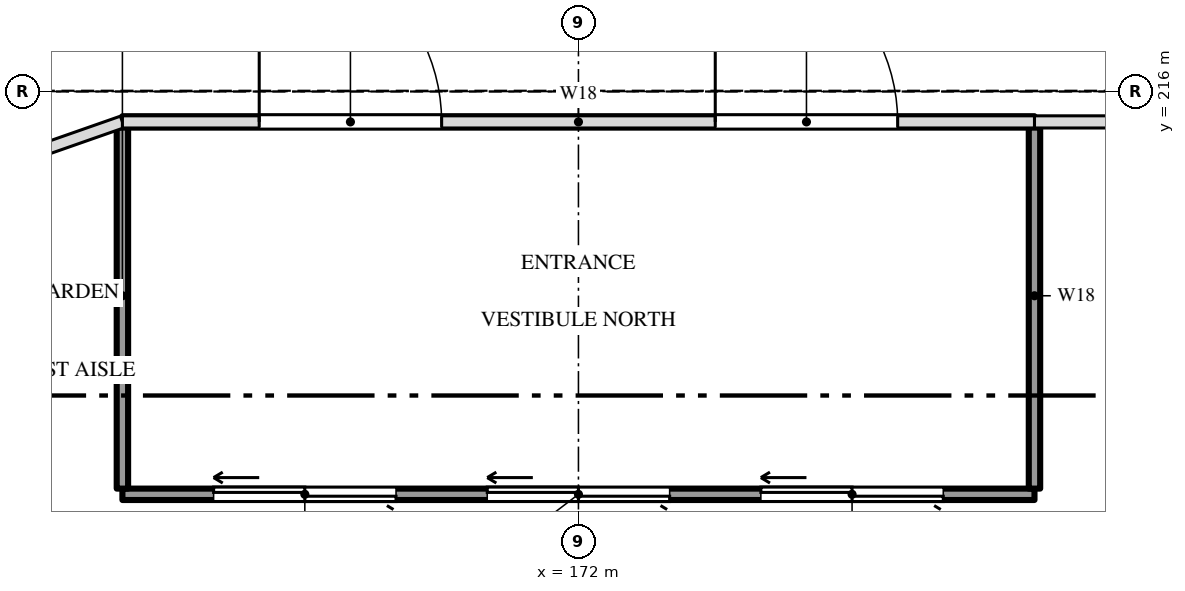
"""IFC4 building model, lengths in metres.
Left out: names, types, materials, properties, quantities, classifications, styles, units other than length and angle.
Written with IfcOpenShell. Run it as: python <this file> out.ifc"""

import sys

from ifc_helpers import new_model, si_unit, direction, frame, frame_2d, origin, place, context, subcontext, project, spatial, rectangle, extrude, element, fill, save


model = new_model("IFC4")
c1 = context("Model", 3, precision=1e-05, world=origin(), true_north=direction((0.0, 1.0)))
c2 = subcontext(c1, "Body", "Model", "MODEL_VIEW")
j1 = project(units=[si_unit("LENGTHUNIT", "METRE"), si_unit("PLANEANGLEUNIT", "RADIAN")], contexts=[c1])
p1 = place(None, origin())
s1 = spatial("IfcSite", under=j1, at=p1, CompositionType="ELEMENT")
p2 = place(p1, origin())
s2 = spatial("IfcBuilding", under=s1, at=p2, CompositionType="ELEMENT")
p3 = place(p2, origin())
s3 = spatial("IfcBuildingStorey", under=s2, at=p3, CompositionType="ELEMENT", Elevation=0.0)
p4 = place(p3, frame((166.0, 215.6, 0.0), z_axis=(0.0, 0.0, 1.0), x_axis=(1.0, 0.0, 0.0)))
e1 = element("IfcWall", 1, at=p4, inside=s3, PredefinedType="SOLIDWALL", context=c2, shape_type="SweptSolid", body=[
    extrude(rectangle(XDim=12.0, YDim=0.15, at=frame_2d((6.0, 0.0))), origin(), (0.0, 0.0, 1.0), 4.3),
])
p5 = place(p4, frame((1.8, 0.0, 0.0)))
e2 = element("IfcOpeningElement", 2, at=p5, cuts=e1, PredefinedType="OPENING", context=c2, shape_type="SweptSolid", body=[
    extrude(rectangle(XDim=2.4, YDim=2.4, at=frame_2d((1.2, 1.2))), frame((0.0, 0.085, 0.0), z_axis=(0.0, -1.0, 0.0), x_axis=(1.0, 0.0, 0.0)), (0.0, 0.0, 1.0), 0.17),
])
p6 = place(p4, frame((7.8, 0.0, 0.0)))
e3 = element("IfcOpeningElement", 3, at=p6, cuts=e1, PredefinedType="OPENING", context=c2, shape_type="SweptSolid", body=[
    extrude(rectangle(XDim=2.4, YDim=2.4, at=frame_2d((1.2, 1.2))), frame((0.0, 0.085, 0.0), z_axis=(0.0, -1.0, 0.0), x_axis=(1.0, 0.0, 0.0)), (0.0, 0.0, 1.0), 0.17),
])
p7 = place(p3, frame((166.0, 210.7, 0.0), z_axis=(0.0, 0.0, 1.0), x_axis=(1.0, 0.0, 0.0)))
e4 = element("IfcWall", 4, at=p7, inside=s3, PredefinedType="SOLIDWALL", context=c2, shape_type="SweptSolid", body=[
    extrude(rectangle(XDim=12.0, YDim=0.15, at=frame_2d((6.0, 0.0))), origin(), (0.0, 0.0, 1.0), 4.3),
])
p8 = place(p7, frame((1.2, 0.0, 0.0)))
e5 = element("IfcOpeningElement", 5, at=p8, cuts=e4, PredefinedType="OPENING", context=c2, shape_type="SweptSolid", body=[
    extrude(rectangle(XDim=2.4, YDim=2.4, at=frame_2d((1.2, 1.2))), frame((0.0, 0.085, 0.0), z_axis=(0.0, -1.0, 0.0), x_axis=(1.0, 0.0, 0.0)), (0.0, 0.0, 1.0), 0.17),
])
p9 = place(p7, frame((4.8, 0.0, 0.0)))
e6 = element("IfcOpeningElement", 6, at=p9, cuts=e4, PredefinedType="OPENING", context=c2, shape_type="SweptSolid", body=[
    extrude(rectangle(XDim=2.4, YDim=2.4, at=frame_2d((1.2, 1.2))), frame((0.0, 0.085, 0.0), z_axis=(0.0, -1.0, 0.0), x_axis=(1.0, 0.0, 0.0)), (0.0, 0.0, 1.0), 0.17),
])
p10 = place(p7, frame((8.4, 0.0, 0.0)))
e7 = element("IfcOpeningElement", 7, at=p10, cuts=e4, PredefinedType="OPENING", context=c2, shape_type="SweptSolid", body=[
    extrude(rectangle(XDim=2.4, YDim=2.4, at=frame_2d((1.2, 1.2))), frame((0.0, 0.085, 0.0), z_axis=(0.0, -1.0, 0.0), x_axis=(1.0, 0.0, 0.0)), (0.0, 0.0, 1.0), 0.17),
])
for number, where, z_axis, x_axis in (
    (8, (166.0, 210.775, 0.0), (0.0, 0.0, 1.0), (0.0, 1.0, 0.0)),
    (9, (178.0, 210.775, 0.0), (0.0, 0.0, 1.0), (0.0, 1.0, 0.0)),
):
    element("IfcWall", number, at=place(p3, frame(where, z_axis=z_axis, x_axis=x_axis)), inside=s3, PredefinedType="SOLIDWALL", context=c2, shape_type="SweptSolid", body=[
        extrude(rectangle(XDim=4.75, YDim=0.15, at=frame_2d((2.375, 0.0))), origin(), (0.0, 0.0, 1.0), 4.3),
    ])
p11 = place(p5, origin())
e10 = element("IfcDoor", 10, at=p11, inside=s3, OperationType="DOUBLE_DOOR_SINGLE_SWING", PredefinedType="DOOR", context=c2, shape_type="SweptSolid", body=[
    extrude(rectangle(XDim=2.4, YDim=2.4, at=frame_2d((1.2, 1.2))), frame((0.0, 0.025, 0.0), z_axis=(0.0, -1.0, 0.0), x_axis=(1.0, 0.0, 0.0)), (0.0, 0.0, 1.0), 0.05),
])
fill(e2, e10)
p12 = place(p6, origin())
e11 = element("IfcDoor", 11, at=p12, inside=s3, OperationType="DOUBLE_DOOR_SINGLE_SWING", PredefinedType="DOOR", context=c2, shape_type="SweptSolid", body=[
    extrude(rectangle(XDim=2.4, YDim=2.4, at=frame_2d((1.2, 1.2))), frame((0.0, 0.025, 0.0), z_axis=(0.0, -1.0, 0.0), x_axis=(1.0, 0.0, 0.0)), (0.0, 0.0, 1.0), 0.05),
])
fill(e3, e11)
p13 = place(p8, origin())
e12 = element("IfcDoor", 12, at=p13, inside=s3, OperationType="DOUBLE_DOOR_SLIDING", PredefinedType="DOOR", context=c2, shape_type="SweptSolid", body=[
    extrude(rectangle(XDim=2.4, YDim=2.4, at=frame_2d((1.2, 1.2))), frame((0.0, 0.025, 0.0), z_axis=(0.0, -1.0, 0.0), x_axis=(1.0, 0.0, 0.0)), (0.0, 0.0, 1.0), 0.05),
])
fill(e5, e12)
p14 = place(p9, origin())
e13 = element("IfcDoor", 13, at=p14, inside=s3, OperationType="DOUBLE_DOOR_SLIDING", PredefinedType="DOOR", context=c2, shape_type="SweptSolid", body=[
    extrude(rectangle(XDim=2.4, YDim=2.4, at=frame_2d((1.2, 1.2))), frame((0.0, 0.025, 0.0), z_axis=(0.0, -1.0, 0.0), x_axis=(1.0, 0.0, 0.0)), (0.0, 0.0, 1.0), 0.05),
])
fill(e6, e13)
p15 = place(p10, origin())
e14 = element("IfcDoor", 14, at=p15, inside=s3, OperationType="DOUBLE_DOOR_SLIDING", PredefinedType="DOOR", context=c2, shape_type="SweptSolid", body=[
    extrude(rectangle(XDim=2.4, YDim=2.4, at=frame_2d((1.2, 1.2))), frame((0.0, 0.025, 0.0), z_axis=(0.0, -1.0, 0.0), x_axis=(1.0, 0.0, 0.0)), (0.0, 0.0, 1.0), 0.05),
])
fill(e7, e14)
save(model, sys.argv[1])
